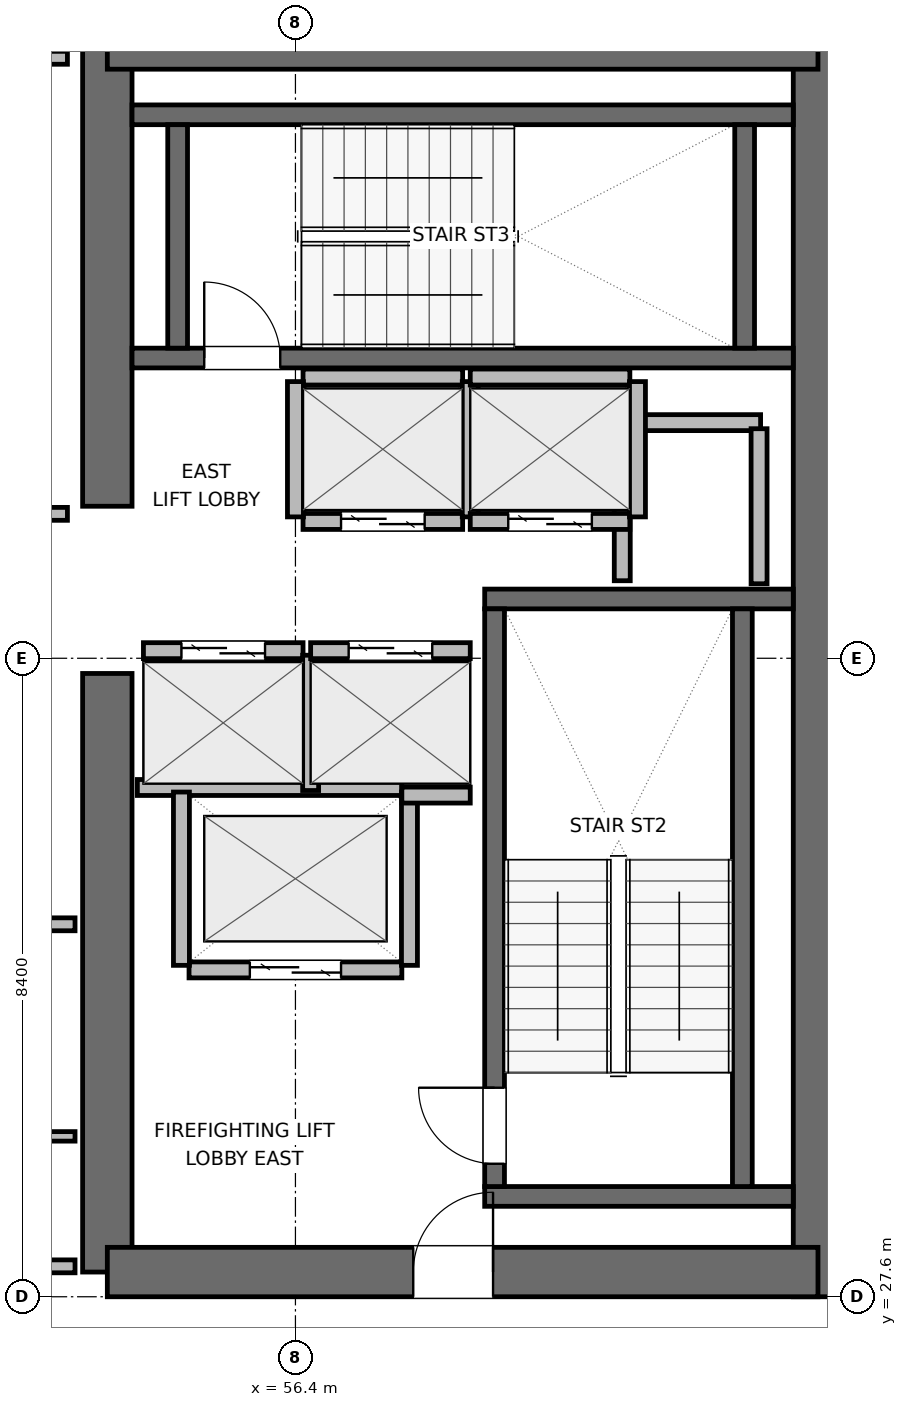
"""IFC4 building model, lengths in metres.
Left out: names, types, materials, properties, quantities, classifications, styles, units other than length and angle.
Written with IfcOpenShell. Run it as: python <this file> out.ifc"""

import sys

from ifc_helpers import new_model, si_unit, direction, frame, frame_2d, origin, place, context, subcontext, project, spatial, rectangle, extrude, element, fill, save


model = new_model("IFC4")
c1 = context("Model", 3, precision=1e-05, world=origin(), true_north=direction((0.0, 1.0)))
c2 = subcontext(c1, "Body", "Model", "MODEL_VIEW")
j1 = project(units=[si_unit("LENGTHUNIT", "METRE"), si_unit("PLANEANGLEUNIT", "RADIAN")], contexts=[c1])
p1 = place(None, origin())
s1 = spatial("IfcSite", under=j1, at=p1, CompositionType="ELEMENT")
p2 = place(p1, origin())
s2 = spatial("IfcBuilding", under=s1, at=p2, CompositionType="ELEMENT")
p3 = place(p2, frame((0.0, 0.0, 258.9)))
s3 = spatial("IfcBuildingStorey", under=s2, at=p3, CompositionType="ELEMENT", Elevation=258.9)
p4 = place(p3, frame((53.925, 27.925, 0.0), z_axis=(0.0, 0.0, 1.0), x_axis=(0.0, 1.0, 0.0)))
e1 = element("IfcWall", 1, at=p4, inside=s3, PredefinedType="SHEAR", context=c2, shape_type="SweptSolid", body=[
    extrude(rectangle(XDim=7.875, YDim=0.65, at=frame_2d((3.938, 0.0))), origin(), (0.0, 0.0, 1.0), 3.9),
])
p5 = place(p3, frame((53.925, 38.0, 0.0), z_axis=(0.0, 0.0, 1.0), x_axis=(0.0, 1.0, 0.0)))
e2 = element("IfcWall", 2, at=p5, inside=s3, PredefinedType="SHEAR", context=c2, shape_type="SweptSolid", body=[
    extrude(rectangle(XDim=6.075, YDim=0.65, at=frame_2d((3.038, 0.0))), origin(), (0.0, 0.0, 1.0), 3.9),
])
p6 = place(p3, frame((63.275, 27.6, 0.0), z_axis=(0.0, 0.0, 1.0), x_axis=(0.0, 1.0, 0.0)))
e3 = element("IfcWall", 3, at=p6, inside=s3, PredefinedType="SHEAR", context=c2, shape_type="SweptSolid", body=[
    extrude(rectangle(XDim=16.8, YDim=0.65, at=frame_2d((8.4, 0.0))), origin(), (0.0, 0.0, 1.0), 3.9),
])
p7 = place(p3, frame((53.925, 27.925, 0.0), z_axis=(0.0, 0.0, 1.0), x_axis=(1.0, 0.0, 0.0)))
e4 = element("IfcWall", 4, at=p7, inside=s3, PredefinedType="SHEAR", context=c2, shape_type="SweptSolid", body=[
    extrude(rectangle(XDim=9.35, YDim=0.65, at=frame_2d((4.675, 0.0))), origin(), (0.0, 0.0, 1.0), 3.9),
])
p8 = place(p7, frame((4.025, 0.0, 0.0)))
e5 = element("IfcOpeningElement", 5, at=p8, cuts=e4, PredefinedType="OPENING", context=c2, shape_type="SweptSolid", body=[
    extrude(rectangle(XDim=1.05, YDim=2.04, at=frame_2d((0.525, 1.02))), frame((0.0, 0.335, 0.0), z_axis=(0.0, -1.0, 0.0), x_axis=(1.0, 0.0, 0.0)), (0.0, 0.0, 1.0), 0.67),
])
p9 = place(p3, frame((53.925, 44.075, 0.0), z_axis=(0.0, 0.0, 1.0), x_axis=(1.0, 0.0, 0.0)))
e6 = element("IfcWall", 6, at=p9, inside=s3, PredefinedType="SHEAR", context=c2, shape_type="SweptSolid", body=[
    extrude(rectangle(XDim=9.35, YDim=0.65, at=frame_2d((4.675, 0.0))), origin(), (0.0, 0.0, 1.0), 3.9),
])
for number, where, z_axis, x_axis in (
    (7, (58.89, 28.92, 0.0), (0.0, 0.0, 1.0), (1.0, 0.0, 0.0)),
    (8, (58.89, 36.78, 0.0), (0.0, 0.0, 1.0), (1.0, 0.0, 0.0)),
):
    element("IfcWall", number, at=place(p3, frame(where, z_axis=z_axis, x_axis=x_axis)), inside=s3, PredefinedType="SHEAR", context=c2, shape_type="SweptSolid", body=[
        extrude(rectangle(XDim=4.06, YDim=0.26, at=frame_2d((2.03, 0.0))), origin(), (0.0, 0.0, 1.0), 3.9),
    ])
p10 = place(p3, frame((59.02, 29.05, 0.0), z_axis=(0.0, 0.0, 1.0), x_axis=(0.0, 1.0, 0.0)))
e9 = element("IfcWall", 9, at=p10, inside=s3, PredefinedType="SHEAR", context=c2, shape_type="SweptSolid", body=[
    extrude(rectangle(XDim=7.6, YDim=0.26, at=frame_2d((3.8, 0.0))), origin(), (0.0, 0.0, 1.0), 3.9),
])
p11 = place(p10, frame((0.3, 0.0, 0.0)))
e10 = element("IfcOpeningElement", 10, at=p11, cuts=e9, PredefinedType="OPENING", context=c2, shape_type="SweptSolid", body=[
    extrude(rectangle(XDim=1.0, YDim=2.04, at=frame_2d((0.5, 1.02))), frame((0.0, 0.14, 0.0), z_axis=(0.0, -1.0, 0.0), x_axis=(1.0, 0.0, 0.0)), (0.0, 0.0, 1.0), 0.28),
])
p12 = place(p3, frame((62.28, 29.05, 0.0), z_axis=(0.0, 0.0, 1.0), x_axis=(0.0, 1.0, 0.0)))
e11 = element("IfcWall", 11, at=p12, inside=s3, PredefinedType="SHEAR", context=c2, shape_type="SweptSolid", body=[
    extrude(rectangle(XDim=7.6, YDim=0.26, at=frame_2d((3.8, 0.0))), origin(), (0.0, 0.0, 1.0), 3.9),
])
p13 = place(p3, frame((54.25, 39.95, 0.0), z_axis=(0.0, 0.0, 1.0), x_axis=(1.0, 0.0, 0.0)))
e12 = element("IfcWall", 12, at=p13, inside=s3, PredefinedType="SHEAR", context=c2, shape_type="SweptSolid", body=[
    extrude(rectangle(XDim=8.7, YDim=0.26, at=frame_2d((4.35, 0.0))), origin(), (0.0, 0.0, 1.0), 3.9),
])
p14 = place(p13, frame((0.95, 0.0, 0.0)))
e13 = element("IfcOpeningElement", 13, at=p14, cuts=e12, PredefinedType="OPENING", context=c2, shape_type="SweptSolid", body=[
    extrude(rectangle(XDim=1.0, YDim=2.04, at=frame_2d((0.5, 1.02))), frame((0.0, 0.14, 0.0), z_axis=(0.0, -1.0, 0.0), x_axis=(1.0, 0.0, 0.0)), (0.0, 0.0, 1.0), 0.28),
])
p15 = place(p3, frame((54.25, 43.15, 0.0), z_axis=(0.0, 0.0, 1.0), x_axis=(1.0, 0.0, 0.0)))
e14 = element("IfcWall", 14, at=p15, inside=s3, PredefinedType="SHEAR", context=c2, shape_type="SweptSolid", body=[
    extrude(rectangle(XDim=8.7, YDim=0.26, at=frame_2d((4.35, 0.0))), origin(), (0.0, 0.0, 1.0), 3.9),
])
for number, where, z_axis, x_axis in (
    (15, (54.85, 40.08, 0.0), (0.0, 0.0, 1.0), (0.0, 1.0, 0.0)),
    (16, (62.31, 40.08, 0.0), (0.0, 0.0, 1.0), (0.0, 1.0, 0.0)),
):
    element("IfcWall", number, at=place(p3, frame(where, z_axis=z_axis, x_axis=x_axis)), inside=s3, PredefinedType="SHEAR", context=c2, shape_type="SweptSolid", body=[
        extrude(rectangle(XDim=2.94, YDim=0.26, at=frame_2d((1.47, 0.0))), origin(), (0.0, 0.0, 1.0), 3.9),
    ])
p16 = place(p3, frame((60.72, 39.1, 0.0), z_axis=(0.0, 0.0, 1.0), x_axis=(1.0, 0.0, 0.0)))
e17 = element("IfcWall", 17, at=p16, inside=s3, PredefinedType="PARTITIONING", context=c2, shape_type="SweptSolid", body=[
    extrude(rectangle(XDim=1.8, YDim=0.21, at=frame_2d((0.9, 0.0))), origin(), (0.0, 0.0, 1.0), 3.68),
])
p17 = place(p3, frame((60.7, 37.02, 0.0), z_axis=(0.0, 0.0, 1.0), x_axis=(0.0, 1.0, 0.0)))
e18 = element("IfcWall", 18, at=p17, inside=s3, PredefinedType="PARTITIONING", context=c2, shape_type="SweptSolid", body=[
    extrude(rectangle(XDim=1.96, YDim=0.21, at=frame_2d((0.98, 0.0))), origin(), (0.0, 0.0, 1.0), 3.68),
])
p18 = place(p3, frame((62.5, 36.98, 0.0), z_axis=(0.0, 0.0, 1.0), x_axis=(0.0, 1.0, 0.0)))
e19 = element("IfcWall", 19, at=p18, inside=s3, PredefinedType="PARTITIONING", context=c2, shape_type="SweptSolid", body=[
    extrude(rectangle(XDim=2.04, YDim=0.21, at=frame_2d((1.02, 0.0))), origin(), (0.0, 0.0, 1.0), 3.68),
])
p19 = place(p3, frame((55.0, 31.9, 0.0), z_axis=(0.0, 0.0, 1.0), x_axis=(1.0, 0.0, 0.0)))
e20 = element("IfcWall", 20, at=p19, inside=s3, PredefinedType="PARTITIONING", context=c2, shape_type="SweptSolid", body=[
    extrude(rectangle(XDim=2.8, YDim=0.21, at=frame_2d((1.4, 0.0))), origin(), (0.0, 0.0, 1.0), 3.68),
])
p20 = place(p19, frame((0.8, 0.0, 0.0)))
e21 = element("IfcOpeningElement", 21, at=p20, cuts=e20, PredefinedType="OPENING", context=c2, shape_type="SweptSolid", body=[
    extrude(rectangle(XDim=1.2, YDim=2.04, at=frame_2d((0.6, 1.02))), frame((0.0, 0.115, 0.0), z_axis=(0.0, -1.0, 0.0), x_axis=(1.0, 0.0, 0.0)), (0.0, 0.0, 1.0), 0.23),
])
p21 = place(p3, frame((54.32, 34.3, 0.0), z_axis=(0.0, 0.0, 1.0), x_axis=(1.0, 0.0, 0.0)))
e22 = element("IfcWall", 22, at=p21, inside=s3, PredefinedType="PARTITIONING", context=c2, shape_type="SweptSolid", body=[
    extrude(rectangle(XDim=3.48, YDim=0.21, at=frame_2d((1.74, 0.0))), origin(), (0.0, 0.0, 1.0), 3.68),
])
for number, where, z_axis, x_axis in (
    (23, (54.9, 31.96, 0.0), (0.0, 0.0, 1.0), (0.0, 1.0, 0.0)),
    (24, (57.9, 31.96, 0.0), (0.0, 0.0, 1.0), (0.0, 1.0, 0.0)),
):
    element("IfcWall", number, at=place(p3, frame(where, z_axis=z_axis, x_axis=x_axis)), inside=s3, PredefinedType="PARTITIONING", context=c2, shape_type="SweptSolid", body=[
        extrude(rectangle(XDim=2.28, YDim=0.21, at=frame_2d((1.14, 0.0))), origin(), (0.0, 0.0, 1.0), 3.68),
    ])
p22 = place(p3, frame((54.4, 36.1, 0.0), z_axis=(0.0, 0.0, 1.0), x_axis=(1.0, 0.0, 0.0)))
e25 = element("IfcWall", 25, at=p22, inside=s3, PredefinedType="PARTITIONING", context=c2, shape_type="SweptSolid", body=[
    extrude(rectangle(XDim=2.1, YDim=0.21, at=frame_2d((1.05, 0.0))), origin(), (0.0, 0.0, 1.0), 3.68),
])
p23 = place(p22, frame((0.5, 0.0, 0.0)))
e26 = element("IfcOpeningElement", 26, at=p23, cuts=e25, PredefinedType="OPENING", context=c2, shape_type="SweptSolid", body=[
    extrude(rectangle(XDim=1.1, YDim=2.04, at=frame_2d((0.55, 1.02))), frame((0.0, 0.115, 0.0), z_axis=(0.0, -1.0, 0.0), x_axis=(1.0, 0.0, 0.0)), (0.0, 0.0, 1.0), 0.23),
])
p24 = place(p3, frame((56.6, 34.26, 0.0), z_axis=(0.0, 0.0, 1.0), x_axis=(0.0, 1.0, 0.0)))
e27 = element("IfcWall", 27, at=p24, inside=s3, PredefinedType="PARTITIONING", context=c2, shape_type="SweptSolid", body=[
    extrude(rectangle(XDim=1.78, YDim=0.21, at=frame_2d((0.89, 0.0))), origin(), (0.0, 0.0, 1.0), 3.68),
])
p25 = place(p3, frame((56.6, 36.1, 0.0), z_axis=(0.0, 0.0, 1.0), x_axis=(1.0, 0.0, 0.0)))
e28 = element("IfcWall", 28, at=p25, inside=s3, PredefinedType="PARTITIONING", context=c2, shape_type="SweptSolid", body=[
    extrude(rectangle(XDim=2.1, YDim=0.21, at=frame_2d((1.05, 0.0))), origin(), (0.0, 0.0, 1.0), 3.68),
])
p26 = place(p25, frame((0.5, 0.0, 0.0)))
e29 = element("IfcOpeningElement", 29, at=p26, cuts=e28, PredefinedType="OPENING", context=c2, shape_type="SweptSolid", body=[
    extrude(rectangle(XDim=1.1, YDim=2.04, at=frame_2d((0.55, 1.02))), frame((0.0, 0.115, 0.0), z_axis=(0.0, -1.0, 0.0), x_axis=(1.0, 0.0, 0.0)), (0.0, 0.0, 1.0), 0.23),
])
p27 = place(p3, frame((57.8, 34.2, 0.0), z_axis=(0.0, 0.0, 1.0), x_axis=(1.0, 0.0, 0.0)))
e30 = element("IfcWall", 30, at=p27, inside=s3, PredefinedType="PARTITIONING", context=c2, shape_type="SweptSolid", body=[
    extrude(rectangle(XDim=0.9, YDim=0.21, at=frame_2d((0.45, 0.0))), origin(), (0.0, 0.0, 1.0), 3.68),
])
p28 = place(p3, frame((56.5, 37.8, 0.0), z_axis=(0.0, 0.0, 1.0), x_axis=(1.0, 0.0, 0.0)))
e31 = element("IfcWall", 31, at=p28, inside=s3, PredefinedType="PARTITIONING", context=c2, shape_type="SweptSolid", body=[
    extrude(rectangle(XDim=2.1, YDim=0.21, at=frame_2d((1.05, 0.0))), origin(), (0.0, 0.0, 1.0), 3.68),
])
p29 = place(p28, frame((0.5, 0.0, 0.0)))
e32 = element("IfcOpeningElement", 32, at=p29, cuts=e31, PredefinedType="OPENING", context=c2, shape_type="SweptSolid", body=[
    extrude(rectangle(XDim=1.1, YDim=2.04, at=frame_2d((0.55, 1.02))), frame((0.0, 0.115, 0.0), z_axis=(0.0, -1.0, 0.0), x_axis=(1.0, 0.0, 0.0)), (0.0, 0.0, 1.0), 0.23),
])
p30 = place(p3, frame((56.5, 39.7, 0.0), z_axis=(0.0, 0.0, 1.0), x_axis=(1.0, 0.0, 0.0)))
e33 = element("IfcWall", 33, at=p30, inside=s3, PredefinedType="PARTITIONING", context=c2, shape_type="SweptSolid", body=[
    extrude(rectangle(XDim=2.1, YDim=0.21, at=frame_2d((1.05, 0.0))), origin(), (0.0, 0.0, 1.0), 3.68),
])
for number, where, z_axis, x_axis in (
    (34, (56.4, 37.86, 0.0), (0.0, 0.0, 1.0), (0.0, 1.0, 0.0)),
    (35, (58.7, 37.86, 0.0), (0.0, 0.0, 1.0), (0.0, 1.0, 0.0)),
):
    element("IfcWall", number, at=place(p3, frame(where, z_axis=z_axis, x_axis=x_axis)), inside=s3, PredefinedType="PARTITIONING", context=c2, shape_type="SweptSolid", body=[
        extrude(rectangle(XDim=1.78, YDim=0.21, at=frame_2d((0.89, 0.0))), origin(), (0.0, 0.0, 1.0), 3.68),
    ])
p31 = place(p3, frame((58.7, 37.8, 0.0), z_axis=(0.0, 0.0, 1.0), x_axis=(1.0, 0.0, 0.0)))
e36 = element("IfcWall", 36, at=p31, inside=s3, PredefinedType="PARTITIONING", context=c2, shape_type="SweptSolid", body=[
    extrude(rectangle(XDim=2.1, YDim=0.21, at=frame_2d((1.05, 0.0))), origin(), (0.0, 0.0, 1.0), 3.68),
])
p32 = place(p31, frame((0.5, 0.0, 0.0)))
e37 = element("IfcOpeningElement", 37, at=p32, cuts=e36, PredefinedType="OPENING", context=c2, shape_type="SweptSolid", body=[
    extrude(rectangle(XDim=1.1, YDim=2.04, at=frame_2d((0.55, 1.02))), frame((0.0, 0.115, 0.0), z_axis=(0.0, -1.0, 0.0), x_axis=(1.0, 0.0, 0.0)), (0.0, 0.0, 1.0), 0.23),
])
p33 = place(p3, frame((58.7, 39.7, 0.0), z_axis=(0.0, 0.0, 1.0), x_axis=(1.0, 0.0, 0.0)))
e38 = element("IfcWall", 38, at=p33, inside=s3, PredefinedType="PARTITIONING", context=c2, shape_type="SweptSolid", body=[
    extrude(rectangle(XDim=2.1, YDim=0.21, at=frame_2d((1.05, 0.0))), origin(), (0.0, 0.0, 1.0), 3.68),
])
p34 = place(p3, frame((60.9, 37.86, 0.0), z_axis=(0.0, 0.0, 1.0), x_axis=(0.0, 1.0, 0.0)))
e39 = element("IfcWall", 39, at=p34, inside=s3, PredefinedType="PARTITIONING", context=c2, shape_type="SweptSolid", body=[
    extrude(rectangle(XDim=1.78, YDim=0.21, at=frame_2d((0.89, 0.0))), origin(), (0.0, 0.0, 1.0), 3.68),
])
p35 = place(p3, frame((49.287, 28.0, 0.0), z_axis=(0.0, 0.0, 1.0), x_axis=(1.0, 0.0, 0.0)))
e40 = element("IfcWall", 40, at=p35, inside=s3, PredefinedType="PARTITIONING", context=c2, shape_type="SweptSolid", body=[
    extrude(rectangle(XDim=4.213, YDim=0.17, at=frame_2d((2.106, 0.0))), origin(), (0.0, 0.0, 1.0), 2.765),
])
p36 = place(p3, frame((52.2, 32.5, 0.0), z_axis=(0.0, 0.0, 1.0), x_axis=(1.0, 0.0, 0.0)))
e41 = element("IfcWall", 41, at=p36, inside=s3, PredefinedType="PARTITIONING", context=c2, shape_type="SweptSolid", body=[
    extrude(rectangle(XDim=1.3, YDim=0.17, at=frame_2d((0.65, 0.0))), origin(), (0.0, 0.0, 1.0), 3.68),
])
p37 = place(p3, frame((49.287, 29.71, 0.0), z_axis=(0.0, 0.0, 1.0), x_axis=(1.0, 0.0, 0.0)))
e42 = element("IfcWall", 42, at=p37, inside=s3, PredefinedType="PARTITIONING", context=c2, shape_type="SweptSolid", body=[
    extrude(rectangle(XDim=4.213, YDim=0.125, at=frame_2d((2.106, 0.0))), origin(), (0.0, 0.0, 1.0), 3.68),
])
p38 = place(p3, frame((49.287, 37.9, 0.0), z_axis=(0.0, 0.0, 1.0), x_axis=(1.0, 0.0, 0.0)))
e43 = element("IfcWall", 43, at=p38, inside=s3, PredefinedType="PARTITIONING", context=c2, shape_type="SweptSolid", body=[
    extrude(rectangle(XDim=4.113, YDim=0.17, at=frame_2d((2.056, 0.0))), origin(), (0.0, 0.0, 1.0), 3.68),
])
p39 = place(p3, frame((49.287, 43.9, 0.0), z_axis=(0.0, 0.0, 1.0), x_axis=(1.0, 0.0, 0.0)))
e44 = element("IfcWall", 44, at=p39, inside=s3, PredefinedType="PARTITIONING", context=c2, shape_type="SweptSolid", body=[
    extrude(rectangle(XDim=4.113, YDim=0.17, at=frame_2d((2.056, 0.0))), origin(), (0.0, 0.0, 1.0), 2.765),
])
p40 = place(p11, origin())
e45 = element("IfcDoor", 45, at=p40, inside=s3, OperationType="SINGLE_SWING_RIGHT", PredefinedType="DOOR", context=c2, shape_type="SweptSolid", body=[
    extrude(rectangle(XDim=1.0, YDim=2.04, at=frame_2d((0.5, 1.02))), frame((0.0, 0.025, 0.0), z_axis=(0.0, -1.0, 0.0), x_axis=(1.0, 0.0, 0.0)), (0.0, 0.0, 1.0), 0.05),
])
fill(e10, e45)
p41 = place(p14, origin())
e46 = element("IfcDoor", 46, at=p41, inside=s3, OperationType="SINGLE_SWING_LEFT", PredefinedType="DOOR", context=c2, shape_type="SweptSolid", body=[
    extrude(rectangle(XDim=1.0, YDim=2.04, at=frame_2d((0.5, 1.02))), frame((0.0, 0.025, 0.0), z_axis=(0.0, -1.0, 0.0), x_axis=(1.0, 0.0, 0.0)), (0.0, 0.0, 1.0), 0.05),
])
fill(e13, e46)
p42 = place(p20, origin())
e47 = element("IfcDoor", 47, at=p42, inside=s3, OperationType="DOUBLE_DOOR_SLIDING", PredefinedType="DOOR", context=c2, shape_type="SweptSolid", body=[
    extrude(rectangle(XDim=1.2, YDim=2.04, at=frame_2d((0.6, 1.02))), frame((0.0, 0.025, 0.0), z_axis=(0.0, -1.0, 0.0), x_axis=(1.0, 0.0, 0.0)), (0.0, 0.0, 1.0), 0.05),
])
fill(e21, e47)
p43 = place(p23, origin())
e48 = element("IfcDoor", 48, at=p43, inside=s3, OperationType="DOUBLE_DOOR_SLIDING", PredefinedType="DOOR", context=c2, shape_type="SweptSolid", body=[
    extrude(rectangle(XDim=1.1, YDim=2.04, at=frame_2d((0.55, 1.02))), frame((0.0, 0.025, 0.0), z_axis=(0.0, -1.0, 0.0), x_axis=(1.0, 0.0, 0.0)), (0.0, 0.0, 1.0), 0.05),
])
fill(e26, e48)
p44 = place(p26, origin())
e49 = element("IfcDoor", 49, at=p44, inside=s3, OperationType="DOUBLE_DOOR_SLIDING", PredefinedType="DOOR", context=c2, shape_type="SweptSolid", body=[
    extrude(rectangle(XDim=1.1, YDim=2.04, at=frame_2d((0.55, 1.02))), frame((0.0, 0.025, 0.0), z_axis=(0.0, -1.0, 0.0), x_axis=(1.0, 0.0, 0.0)), (0.0, 0.0, 1.0), 0.05),
])
fill(e29, e49)
p45 = place(p29, origin())
e50 = element("IfcDoor", 50, at=p45, inside=s3, OperationType="DOUBLE_DOOR_SLIDING", PredefinedType="DOOR", context=c2, shape_type="SweptSolid", body=[
    extrude(rectangle(XDim=1.1, YDim=2.04, at=frame_2d((0.55, 1.02))), frame((0.0, 0.025, 0.0), z_axis=(0.0, -1.0, 0.0), x_axis=(1.0, 0.0, 0.0)), (0.0, 0.0, 1.0), 0.05),
])
fill(e32, e50)
p46 = place(p32, origin())
e51 = element("IfcDoor", 51, at=p46, inside=s3, OperationType="DOUBLE_DOOR_SLIDING", PredefinedType="DOOR", context=c2, shape_type="SweptSolid", body=[
    extrude(rectangle(XDim=1.1, YDim=2.04, at=frame_2d((0.55, 1.02))), frame((0.0, 0.025, 0.0), z_axis=(0.0, -1.0, 0.0), x_axis=(1.0, 0.0, 0.0)), (0.0, 0.0, 1.0), 0.05),
])
fill(e37, e51)
p47 = place(p8, origin())
e52 = element("IfcDoor", 52, at=p47, inside=s3, OperationType="SINGLE_SWING_RIGHT", PredefinedType="DOOR", context=c2, shape_type="SweptSolid", body=[
    extrude(rectangle(XDim=1.05, YDim=2.04, at=frame_2d((0.525, 1.02))), frame((0.0, 0.025, 0.0), z_axis=(0.0, -1.0, 0.0), x_axis=(1.0, 0.0, 0.0)), (0.0, 0.0, 1.0), 0.05),
])
fill(e5, e52)
save(model, sys.argv[1])
